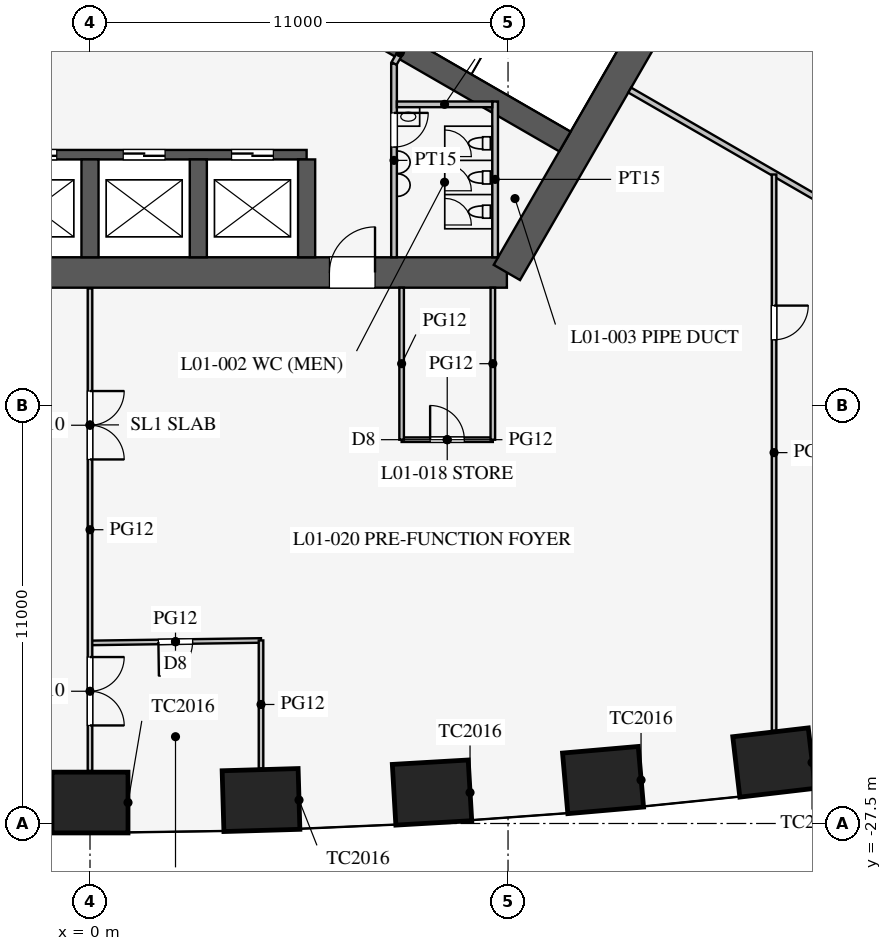
"""IFC4 building model, lengths in metres.
Left out: names, types, materials, properties, quantities, classifications, styles, units other than length and angle.
Written with IfcOpenShell. Run it as: python <this file> out.ifc"""

import sys

from ifc_helpers import new_model, si_unit, direction, frame, frame_2d, origin, origin_2d, place, context, subcontext, project, spatial, rectangle, extrude, element, fill, save


model = new_model("IFC4")
c1 = context("Model", 3, precision=1e-05, world=origin(), true_north=direction((0.0, 1.0)))
c2 = subcontext(c1, "Body", "Model", "MODEL_VIEW")
j1 = project(units=[si_unit("LENGTHUNIT", "METRE"), si_unit("PLANEANGLEUNIT", "RADIAN")], contexts=[c1])
p1 = place(None, origin())
s1 = spatial("IfcSite", under=j1, at=p1, CompositionType="ELEMENT")
p2 = place(p1, origin())
s2 = spatial("IfcBuilding", under=s1, at=p2, CompositionType="ELEMENT")
p3 = place(p2, frame((0.0, 0.0, 6.5)))
s3 = spatial("IfcBuildingStorey", under=s2, at=p3, CompositionType="ELEMENT", Elevation=6.5)
for number, where, z_axis, x_axis in (
    (1, (0.0, -26.949, 0.0), (0.0, 0.0, 1.0), (1.0, 0.0, 0.0)),
    (2, (4.5, -26.883, 0.0), (0.0, 0.0, 1.0), (1.0, 0.029, 0.0)),
    (3, (9.0, -26.686, 0.0), (0.0, 0.0, 1.0), (0.998, 0.058, 0.0)),
    (4, (13.5, -26.357, 0.0), (0.0, 0.0, 1.0), (0.996, 0.087, 0.0)),
    (5, (18.0, -25.895, 0.0), (0.0, 0.0, 1.0), (0.993, 0.116, 0.0)),
):
    element("IfcColumn", number, at=place(p3, frame(where, z_axis=z_axis, x_axis=x_axis)), inside=s3, PredefinedType="COLUMN", context=c2, shape_type="SweptSolid", body=[
        extrude(rectangle(XDim=2.0, YDim=1.6, at=origin_2d()), origin(), (0.0, 0.0, 1.0), 5.0),
    ])
p4 = place(p3, frame((-10.97, -13.0, 0.0), z_axis=(0.0, 0.0, 1.0), x_axis=(1.0, 0.0, 0.0)))
e6 = element("IfcWall", 6, at=p4, inside=s3, PredefinedType="SHEAR", context=c2, shape_type="SweptSolid", body=[
    extrude(rectangle(XDim=21.939, YDim=0.8, at=frame_2d((10.97, 0.0))), origin(), (0.0, 0.0, 1.0), 5.0),
])
p5 = place(p4, frame((17.27, 0.0, 0.0)))
e7 = element("IfcOpeningElement", 7, at=p5, cuts=e6, PredefinedType="OPENING", context=c2, shape_type="SweptSolid", body=[
    extrude(rectangle(XDim=1.2, YDim=2.1, at=frame_2d((0.6, 1.05))), frame((0.0, 0.41, 0.0), z_axis=(0.0, -1.0, 0.0), x_axis=(1.0, 0.0, 0.0)), (0.0, 0.0, 1.0), 0.82),
])
p6 = place(p4, frame((3.47, 0.0, 0.0)))
e8 = element("IfcOpeningElement", 8, at=p6, cuts=e6, PredefinedType="OPENING", context=c2, shape_type="SweptSolid", body=[
    extrude(rectangle(XDim=1.2, YDim=2.1, at=frame_2d((0.6, 1.05))), frame((0.0, 0.41, 0.0), z_axis=(0.0, -1.0, 0.0), x_axis=(1.0, 0.0, 0.0)), (0.0, 0.0, 1.0), 0.82),
])
p7 = place(p3, frame((10.97, -13.0, 0.0), z_axis=(0.0, 0.0, 1.0), x_axis=(0.499995765644, 0.866027848477, 0.0)))
e9 = element("IfcWall", 9, at=p7, inside=s3, PredefinedType="SHEAR", context=c2, shape_type="SweptSolid", body=[
    extrude(rectangle(XDim=11.547, YDim=0.8, at=frame_2d((5.773, 0.0))), origin(), (0.0, 0.0, 1.0), 5.0),
])
p8 = place(p3, frame((-5.7, -9.9, 0.0), z_axis=(0.0, 0.0, 1.0), x_axis=(1.0, 0.0, 0.0)))
e10 = element("IfcWall", 10, at=p8, inside=s3, PredefinedType="SHEAR", context=c2, shape_type="SweptSolid", body=[
    extrude(rectangle(XDim=11.4, YDim=0.25, at=frame_2d((5.7, 0.0))), origin(), (0.0, 0.0, 1.0), 5.0),
])
p9 = place(p8, frame((0.875, 0.0, 0.0)))
e11 = element("IfcOpeningElement", 11, at=p9, cuts=e10, PredefinedType="OPENING", context=c2, shape_type="SweptSolid", body=[
    extrude(rectangle(XDim=1.1, YDim=2.2, at=frame_2d((0.55, 1.1))), frame((0.0, 0.135, 0.0), z_axis=(0.0, -1.0, 0.0), x_axis=(1.0, 0.0, 0.0)), (0.0, 0.0, 1.0), 0.27),
])
p10 = place(p8, frame((3.725, 0.0, 0.0)))
e12 = element("IfcOpeningElement", 12, at=p10, cuts=e10, PredefinedType="OPENING", context=c2, shape_type="SweptSolid", body=[
    extrude(rectangle(XDim=1.1, YDim=2.2, at=frame_2d((0.55, 1.1))), frame((0.0, 0.135, 0.0), z_axis=(0.0, -1.0, 0.0), x_axis=(1.0, 0.0, 0.0)), (0.0, 0.0, 1.0), 0.27),
])
p11 = place(p8, frame((6.575, 0.0, 0.0)))
e13 = element("IfcOpeningElement", 13, at=p11, cuts=e10, PredefinedType="OPENING", context=c2, shape_type="SweptSolid", body=[
    extrude(rectangle(XDim=1.1, YDim=2.2, at=frame_2d((0.55, 1.1))), frame((0.0, 0.135, 0.0), z_axis=(0.0, -1.0, 0.0), x_axis=(1.0, 0.0, 0.0)), (0.0, 0.0, 1.0), 0.27),
])
p12 = place(p8, frame((9.425, 0.0, 0.0)))
e14 = element("IfcOpeningElement", 14, at=p12, cuts=e10, PredefinedType="OPENING", context=c2, shape_type="SweptSolid", body=[
    extrude(rectangle(XDim=1.1, YDim=2.2, at=frame_2d((0.55, 1.1))), frame((0.0, 0.135, 0.0), z_axis=(0.0, -1.0, 0.0), x_axis=(1.0, 0.0, 0.0)), (0.0, 0.0, 1.0), 0.27),
])
for number, where, z_axis, x_axis in (
    (15, (0.0, -10.025, 0.0), (0.0, 0.0, 1.0), (0.0, -1.0, 0.0)),
    (16, (2.85, -10.025, 0.0), (0.0, 0.0, 1.0), (0.0, -1.0, 0.0)),
    (17, (5.7, -10.025, 0.0), (0.0, 0.0, 1.0), (0.0, -1.0, 0.0)),
):
    element("IfcWall", number, at=place(p3, frame(where, z_axis=z_axis, x_axis=x_axis)), inside=s3, PredefinedType="SHEAR", context=c2, shape_type="SweptSolid", body=[
        extrude(rectangle(XDim=2.575, YDim=0.45, at=frame_2d((1.288, 0.0))), origin(), (0.0, 0.0, 1.0), 5.0),
    ])
p13 = place(p3, frame((4.638, -5.016, 0.0), z_axis=(0.0, 0.0, 1.0), x_axis=(0.866019375473, -0.500010441196, 0.0)))
e18 = element("IfcWall", 18, at=p13, inside=s3, PredefinedType="SHEAR", context=c2, shape_type="SweptSolid", body=[
    extrude(rectangle(XDim=9.075, YDim=0.6, at=frame_2d((4.538, 0.0))), origin(), (0.0, 0.0, 1.0), 5.0),
])
p14 = place(p3, frame((8.0, -7.5, 0.0), z_axis=(0.0, 0.0, 1.0), x_axis=(0.0, -1.0, 0.0)))
e19 = element("IfcWall", 19, at=p14, inside=s3, PredefinedType="PARTITIONING", context=c2, shape_type="SweptSolid", body=[
    extrude(rectangle(XDim=5.1, YDim=0.15, at=frame_2d((2.55, 0.0))), origin(), (0.0, 0.0, 1.0), 4.8),
])
p15 = place(p14, frame((1.3, 0.0, 0.0)))
e20 = element("IfcOpeningElement", 20, at=p15, cuts=e19, PredefinedType="OPENING", context=c2, shape_type="SweptSolid", body=[
    extrude(rectangle(XDim=0.9, YDim=2.1, at=frame_2d((0.45, 1.05))), frame((0.0, 0.085, 0.0), z_axis=(0.0, -1.0, 0.0), x_axis=(1.0, 0.0, 0.0)), (0.0, 0.0, 1.0), 0.17),
])
p16 = place(p3, frame((8.0, -7.5, 0.0), z_axis=(0.0, 0.0, 1.0), x_axis=(0.499842556608, 0.866116284689, 0.0)))
e21 = element("IfcWall", 21, at=p16, inside=s3, PredefinedType="PARTITIONING", context=c2, shape_type="SweptSolid", body=[
    extrude(rectangle(XDim=0.645, YDim=0.15, at=frame_2d((0.323, 0.0))), origin(), (0.0, 0.0, 1.0), 4.8),
])
p17 = place(p3, frame((10.66, -8.5, 0.0), z_axis=(0.0, 0.0, 1.0), x_axis=(0.0, -1.0, 0.0)))
e22 = element("IfcWall", 22, at=p17, inside=s3, PredefinedType="PARTITIONING", context=c2, shape_type="SweptSolid", body=[
    extrude(rectangle(XDim=4.1, YDim=0.15, at=frame_2d((2.05, 0.0))), origin(), (0.0, 0.0, 1.0), 4.8),
])
p18 = place(p3, frame((8.075, -8.575, 0.0), z_axis=(0.0, 0.0, 1.0), x_axis=(1.0, 0.0, 0.0)))
e23 = element("IfcWall", 23, at=p18, inside=s3, PredefinedType="PARTITIONING", context=c2, shape_type="SweptSolid", body=[
    extrude(rectangle(XDim=2.51, YDim=0.15, at=frame_2d((1.255, 0.0))), origin(), (0.0, 0.0, 1.0), 4.8),
])
p19 = place(p3, frame((14.203, -8.2, 0.0), z_axis=(0.0, 0.0, 1.0), x_axis=(0.866024965723, -0.500000758745, 0.0)))
e24 = element("IfcWall", 24, at=p19, inside=s3, PredefinedType="PARTITIONING", context=c2, shape_type="SweptSolid", body=[
    extrude(rectangle(XDim=18.25, YDim=0.15, at=frame_2d((9.125, 0.0))), origin(), (0.0, 0.0, 1.0), 3.1),
])
p20 = place(p3, frame((8.2, -17.4, 0.0), z_axis=(0.0, 0.0, 1.0), x_axis=(1.0, 0.0, 0.0)))
e25 = element("IfcWall", 25, at=p20, inside=s3, PredefinedType="PARTITIONING", context=c2, shape_type="SweptSolid", body=[
    extrude(rectangle(XDim=2.4, YDim=0.12, at=frame_2d((1.2, 0.0))), origin(), (0.0, 0.0, 1.0), 3.6),
])
p21 = place(p20, frame((0.75, 0.0, 0.0)))
e26 = element("IfcOpeningElement", 26, at=p21, cuts=e25, PredefinedType="OPENING", context=c2, shape_type="SweptSolid", body=[
    extrude(rectangle(XDim=0.9, YDim=2.1, at=frame_2d((0.45, 1.05))), frame((0.0, 0.07, 0.0), z_axis=(0.0, -1.0, 0.0), x_axis=(1.0, 0.0, 0.0)), (0.0, 0.0, 1.0), 0.14),
])
for number, where, z_axis, x_axis in (
    (27, (10.6, -13.4, 0.0), (0.0, 0.0, 1.0), (0.0, -1.0, 0.0)),
    (28, (8.2, -13.4, 0.0), (0.0, 0.0, 1.0), (0.0, -1.0, 0.0)),
):
    element("IfcWall", number, at=place(p3, frame(where, z_axis=z_axis, x_axis=x_axis)), inside=s3, PredefinedType="PARTITIONING", context=c2, shape_type="SweptSolid", body=[
        extrude(rectangle(XDim=4.0, YDim=0.12, at=frame_2d((2.0, 0.0))), origin(), (0.0, 0.0, 1.0), 3.6),
    ])
p22 = place(p3, frame((0.0, -22.749, 0.0), z_axis=(0.0, 0.0, 1.0), x_axis=(0.999894311967, 0.014538393859, 0.0)))
e29 = element("IfcWall", 29, at=p22, inside=s3, PredefinedType="PARTITIONING", context=c2, shape_type="SweptSolid", body=[
    extrude(rectangle(XDim=4.5, YDim=0.12, at=frame_2d((2.25, 0.0))), origin(), (0.0, 0.0, 1.0), 3.6),
])
p23 = place(p22, frame((1.8, 0.0, 0.0)))
e30 = element("IfcOpeningElement", 30, at=p23, cuts=e29, PredefinedType="OPENING", context=c2, shape_type="SweptSolid", body=[
    extrude(rectangle(XDim=0.9, YDim=2.1, at=frame_2d((0.45, 1.05))), frame((0.0, 0.07, 0.0), z_axis=(0.0, -1.0, 0.0), x_axis=(1.0, 0.0, 0.0)), (0.0, 0.0, 1.0), 0.14),
])
p24 = place(p3, frame((0.0, -13.42, 0.0), z_axis=(0.0, 0.0, 1.0), x_axis=(0.0, -1.0, 0.0)))
e31 = element("IfcWall", 31, at=p24, inside=s3, PredefinedType="PARTITIONING", context=c2, shape_type="SweptSolid", body=[
    extrude(rectangle(XDim=12.699, YDim=0.12, at=frame_2d((6.349, 0.0))), origin(), (0.0, 0.0, 1.0), 3.6),
])
p25 = place(p24, frame((2.7, 0.0, 0.0)))
e32 = element("IfcOpeningElement", 32, at=p25, cuts=e31, PredefinedType="OPENING", context=c2, shape_type="SweptSolid", body=[
    extrude(rectangle(XDim=1.8, YDim=2.1, at=frame_2d((0.9, 1.05))), frame((0.0, 0.07, 0.0), z_axis=(0.0, -1.0, 0.0), x_axis=(1.0, 0.0, 0.0)), (0.0, 0.0, 1.0), 0.14),
])
p26 = place(p24, frame((9.7, 0.0, 0.0)))
e33 = element("IfcOpeningElement", 33, at=p26, cuts=e31, PredefinedType="OPENING", context=c2, shape_type="SweptSolid", body=[
    extrude(rectangle(XDim=1.8, YDim=2.1, at=frame_2d((0.9, 1.05))), frame((0.0, 0.07, 0.0), z_axis=(0.0, -1.0, 0.0), x_axis=(1.0, 0.0, 0.0)), (0.0, 0.0, 1.0), 0.14),
])
p27 = place(p3, frame((18.0, -10.421, 0.0), z_axis=(0.0, 0.0, 1.0), x_axis=(0.0, -1.0, 0.0)))
e34 = element("IfcWall", 34, at=p27, inside=s3, PredefinedType="PARTITIONING", context=c2, shape_type="SweptSolid", body=[
    extrude(rectangle(XDim=14.638, YDim=0.12, at=frame_2d((7.319, 0.0))), origin(), (0.0, 0.0, 1.0), 3.6),
])
p28 = place(p27, frame((3.45, 0.0, 0.0)))
e35 = element("IfcOpeningElement", 35, at=p28, cuts=e34, PredefinedType="OPENING", context=c2, shape_type="SweptSolid", body=[
    extrude(rectangle(XDim=0.9, YDim=2.1, at=frame_2d((0.45, 1.05))), frame((0.0, 0.07, 0.0), z_axis=(0.0, -1.0, 0.0), x_axis=(1.0, 0.0, 0.0)), (0.0, 0.0, 1.0), 0.14),
])
p29 = place(p3, frame((4.5, -22.683, 0.0), z_axis=(0.0, 0.0, 1.0), x_axis=(0.0, -1.0, 0.0)))
e36 = element("IfcWall", 36, at=p29, inside=s3, PredefinedType="PARTITIONING", context=c2, shape_type="SweptSolid", body=[
    extrude(rectangle(XDim=3.369, YDim=0.12, at=frame_2d((1.685, 0.0))), origin(), (0.0, 0.0, 1.0), 3.6),
])
p30 = place(p15, origin())
e37 = element("IfcDoor", 37, at=p30, inside=s3, OperationType="SINGLE_SWING_LEFT", PredefinedType="DOOR", context=c2, shape_type="SweptSolid", body=[
    extrude(rectangle(XDim=0.9, YDim=2.1, at=frame_2d((0.45, 1.05))), frame((0.0, 0.025, 0.0), z_axis=(0.0, -1.0, 0.0), x_axis=(1.0, 0.0, 0.0)), (0.0, 0.0, 1.0), 0.05),
])
fill(e20, e37)
p31 = place(p5, origin())
e38 = element("IfcDoor", 38, at=p31, inside=s3, OperationType="SINGLE_SWING_RIGHT", PredefinedType="DOOR", context=c2, shape_type="SweptSolid", body=[
    extrude(rectangle(XDim=1.2, YDim=2.1, at=frame_2d((0.6, 1.05))), frame((0.0, 0.025, 0.0), z_axis=(0.0, -1.0, 0.0), x_axis=(1.0, 0.0, 0.0)), (0.0, 0.0, 1.0), 0.05),
])
fill(e7, e38)
p32 = place(p25, origin())
e39 = element("IfcDoor", 39, at=p32, inside=s3, OperationType="DOUBLE_DOOR_SINGLE_SWING", PredefinedType="DOOR", context=c2, shape_type="SweptSolid", body=[
    extrude(rectangle(XDim=1.8, YDim=2.1, at=frame_2d((0.9, 1.05))), frame((0.0, 0.025, 0.0), z_axis=(0.0, -1.0, 0.0), x_axis=(1.0, 0.0, 0.0)), (0.0, 0.0, 1.0), 0.05),
])
fill(e32, e39)
p33 = place(p26, origin())
e40 = element("IfcDoor", 40, at=p33, inside=s3, OperationType="DOUBLE_DOOR_SINGLE_SWING", PredefinedType="DOOR", context=c2, shape_type="SweptSolid", body=[
    extrude(rectangle(XDim=1.8, YDim=2.1, at=frame_2d((0.9, 1.05))), frame((0.0, 0.025, 0.0), z_axis=(0.0, -1.0, 0.0), x_axis=(1.0, 0.0, 0.0)), (0.0, 0.0, 1.0), 0.05),
])
fill(e33, e40)
p34 = place(p28, origin())
e41 = element("IfcDoor", 41, at=p34, inside=s3, OperationType="SINGLE_SWING_LEFT", PredefinedType="DOOR", context=c2, shape_type="SweptSolid", body=[
    extrude(rectangle(XDim=0.9, YDim=2.1, at=frame_2d((0.45, 1.05))), frame((0.0, 0.025, 0.0), z_axis=(0.0, -1.0, 0.0), x_axis=(1.0, 0.0, 0.0)), (0.0, 0.0, 1.0), 0.05),
])
fill(e35, e41)
p35 = place(p21, origin())
e42 = element("IfcDoor", 42, at=p35, inside=s3, OperationType="SINGLE_SWING_LEFT", PredefinedType="DOOR", context=c2, shape_type="SweptSolid", body=[
    extrude(rectangle(XDim=0.9, YDim=2.1, at=frame_2d((0.45, 1.05))), frame((0.0, 0.025, 0.0), z_axis=(0.0, -1.0, 0.0), x_axis=(1.0, 0.0, 0.0)), (0.0, 0.0, 1.0), 0.05),
])
fill(e26, e42)
p36 = place(p23, frame((0.9, 0.0, 0.0), z_axis=(0.0, 0.0, 1.0), x_axis=(-1.0, 0.0, 0.0)))
e43 = element("IfcDoor", 43, at=p36, inside=s3, OperationType="SINGLE_SWING_RIGHT", PredefinedType="DOOR", context=c2, shape_type="SweptSolid", body=[
    extrude(rectangle(XDim=0.9, YDim=2.1, at=frame_2d((0.45, 1.05))), frame((0.0, 0.025, 0.0), z_axis=(0.0, -1.0, 0.0), x_axis=(1.0, 0.0, 0.0)), (0.0, 0.0, 1.0), 0.05),
])
fill(e30, e43)
p37 = place(p10, origin())
e44 = element("IfcDoor", 44, at=p37, inside=s3, OperationType="DOUBLE_DOOR_SLIDING", PredefinedType="DOOR", context=c2, shape_type="SweptSolid", body=[
    extrude(rectangle(XDim=1.1, YDim=2.2, at=frame_2d((0.55, 1.1))), frame((0.0, 0.025, 0.0), z_axis=(0.0, -1.0, 0.0), x_axis=(1.0, 0.0, 0.0)), (0.0, 0.0, 1.0), 0.05),
])
fill(e12, e44)
p38 = place(p11, origin())
e45 = element("IfcDoor", 45, at=p38, inside=s3, OperationType="DOUBLE_DOOR_SLIDING", PredefinedType="DOOR", context=c2, shape_type="SweptSolid", body=[
    extrude(rectangle(XDim=1.1, YDim=2.2, at=frame_2d((0.55, 1.1))), frame((0.0, 0.025, 0.0), z_axis=(0.0, -1.0, 0.0), x_axis=(1.0, 0.0, 0.0)), (0.0, 0.0, 1.0), 0.05),
])
fill(e13, e45)
p39 = place(p12, origin())
e46 = element("IfcDoor", 46, at=p39, inside=s3, OperationType="DOUBLE_DOOR_SLIDING", PredefinedType="DOOR", context=c2, shape_type="SweptSolid", body=[
    extrude(rectangle(XDim=1.1, YDim=2.2, at=frame_2d((0.55, 1.1))), frame((0.0, 0.025, 0.0), z_axis=(0.0, -1.0, 0.0), x_axis=(1.0, 0.0, 0.0)), (0.0, 0.0, 1.0), 0.05),
])
fill(e14, e46)
save(model, sys.argv[1])
